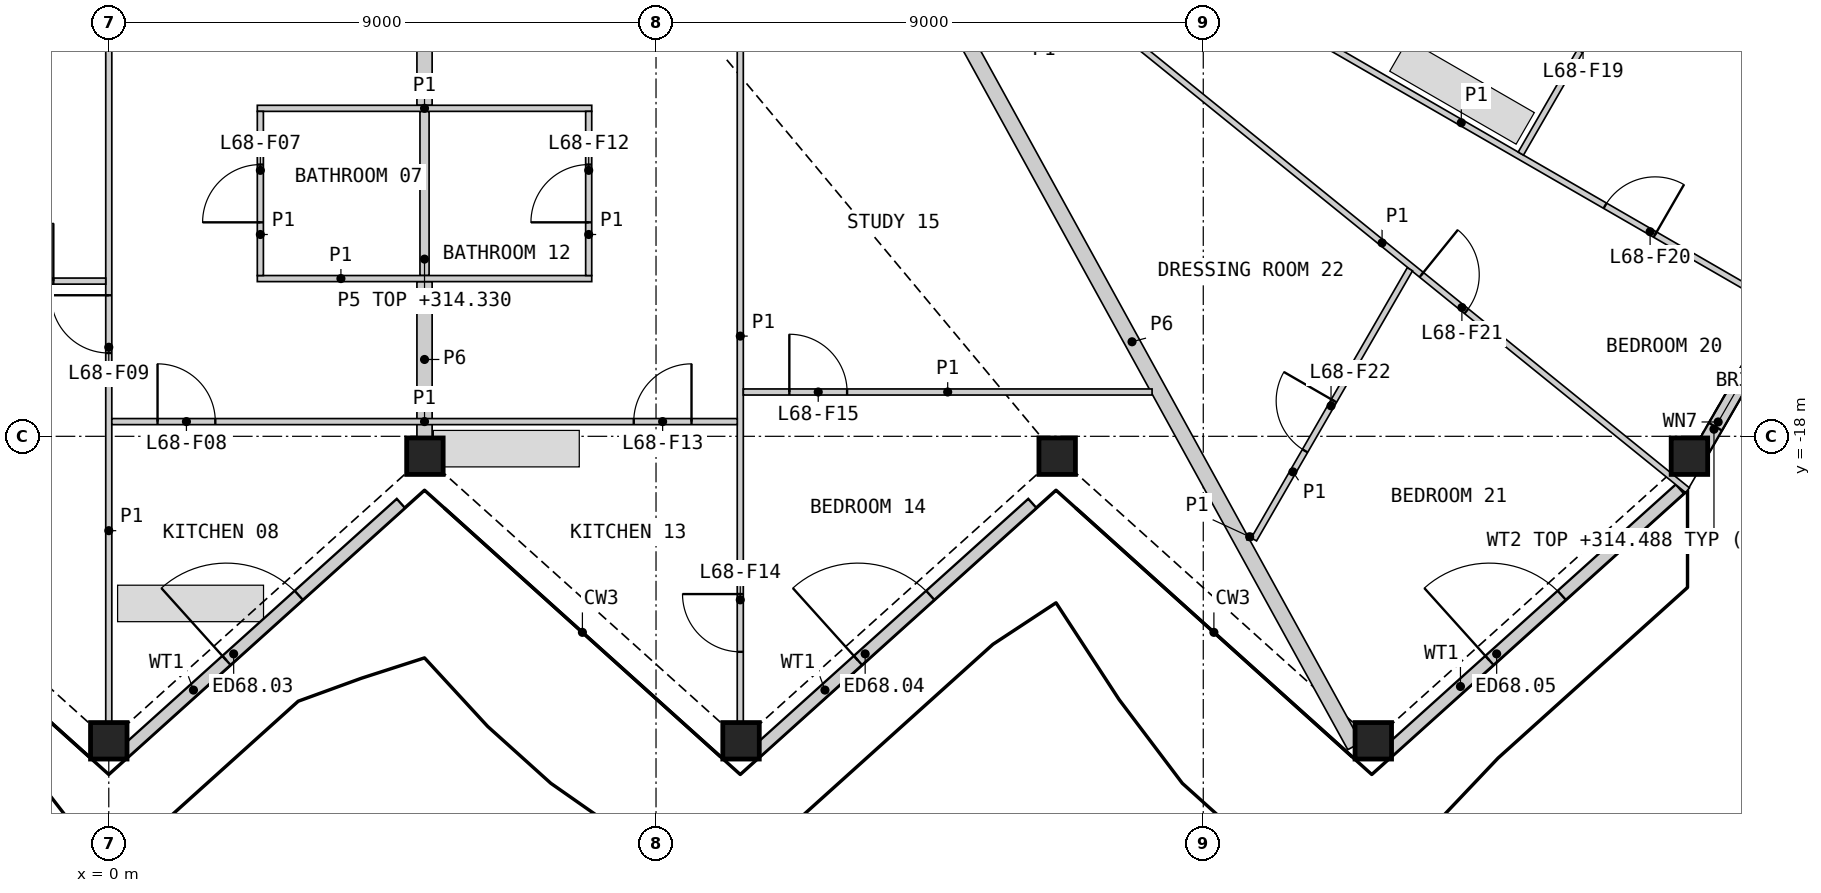
"""IFC4 building model, lengths in metres.
Left out: names, types, materials, properties, quantities, classifications, styles, units other than length and angle.
Written with IfcOpenShell. Run it as: python <this file> out.ifc"""

import sys

from ifc_helpers import new_model, si_unit, direction, frame, frame_2d, origin, origin_2d, place, context, subcontext, project, spatial, rectangle, hollow_rectangle, extrude, element, fill, save


model = new_model("IFC4")
c1 = context("Model", 3, precision=1e-05, world=origin(), true_north=direction((0.0, 1.0)))
c2 = subcontext(c1, "Body", "Model", "MODEL_VIEW")
j1 = project(units=[si_unit("LENGTHUNIT", "METRE"), si_unit("PLANEANGLEUNIT", "RADIAN")], contexts=[c1])
p1 = place(None, origin())
s1 = spatial("IfcSite", under=j1, at=p1, CompositionType="ELEMENT")
p2 = place(p1, origin())
s2 = spatial("IfcBuilding", under=s1, at=p2, CompositionType="ELEMENT")
p3 = place(p2, frame((0.0, 0.0, 312.0)))
s3 = spatial("IfcBuildingStorey", under=s2, at=p3, CompositionType="ELEMENT", Elevation=312.0)
for number, where, z_axis, x_axis in (
    (1, (0.0, -23.008, 0.0), (0.0, 0.0, 1.0), (1.0, 0.0, 0.0)),
    (2, (5.199, -18.327, 0.0), (0.0, 0.0, 1.0), (1.0, 0.0, 0.0)),
    (3, (10.398, -23.008, 0.0), (0.0, 0.0, 1.0), (1.0, 0.0, 0.0)),
    (4, (15.597, -18.327, 0.0), (0.0, 0.0, 1.0), (1.0, 0.0, 0.0)),
    (5, (20.796, -23.008, 0.0), (0.0, 0.0, 1.0), (1.0, 0.0, 0.0)),
    (6, (25.995, -18.327, 0.0), (0.0, 0.0, 1.0), (1.0, 0.0, 0.0)),
):
    element("IfcColumn", number, at=place(p3, frame(where, z_axis=z_axis, x_axis=x_axis)), inside=s3, PredefinedType="COLUMN", context=c2, shape_type="SweptSolid", body=[
        extrude(hollow_rectangle(XDim=0.6, YDim=0.6, WallThickness=0.04, at=origin_2d()), origin(), (0.0, 0.0, 1.0), 3.4),
    ])
p4 = place(p3, frame((0.256, -23.198, 0.0), z_axis=(0.0, 0.0, 1.0), x_axis=(0.743139400616, 0.669136631229, 0.0)))
e7 = element("IfcWall", 7, at=p4, inside=s3, PredefinedType="SOLIDWALL", context=c2, shape_type="SweptSolid", body=[
    extrude(rectangle(XDim=6.12, YDim=0.2, at=frame_2d((3.06, 0.0))), origin(), (0.0, 0.0, 1.0), 2.488),
])
p5 = place(p4, frame((2.26, 0.0, 0.0)))
e8 = element("IfcOpeningElement", 8, at=p5, cuts=e7, PredefinedType="OPENING", context=c2, shape_type="SweptSolid", body=[
    extrude(rectangle(XDim=1.6, YDim=2.25, at=frame_2d((0.8, 1.125))), frame((0.0, 0.11, 0.0), z_axis=(0.0, -1.0, 0.0), x_axis=(1.0, 0.0, 0.0)), (0.0, 0.0, 1.0), 0.22),
])
p6 = place(p3, frame((10.641, -23.198, 0.0), z_axis=(0.0, 0.0, 1.0), x_axis=(0.743121537674, 0.66915646918, 0.0)))
e9 = element("IfcWall", 9, at=p6, inside=s3, PredefinedType="SOLIDWALL", context=c2, shape_type="SweptSolid", body=[
    extrude(rectangle(XDim=6.12, YDim=0.2, at=frame_2d((3.06, 0.0))), origin(), (0.0, 0.0, 1.0), 2.488),
])
p7 = place(p6, frame((2.26, 0.0, 0.0)))
e10 = element("IfcOpeningElement", 10, at=p7, cuts=e9, PredefinedType="OPENING", context=c2, shape_type="SweptSolid", body=[
    extrude(rectangle(XDim=1.6, YDim=2.25, at=frame_2d((0.8, 1.125))), frame((0.0, 0.11, 0.0), z_axis=(0.0, -1.0, 0.0), x_axis=(1.0, 0.0, 0.0)), (0.0, 0.0, 1.0), 0.22),
])
p8 = place(p3, frame((21.027, -23.198, 0.0), z_axis=(0.0, 0.0, 1.0), x_axis=(0.74314788005, 0.669127213897, 0.0)))
e11 = element("IfcWall", 11, at=p8, inside=s3, PredefinedType="SOLIDWALL", context=c2, shape_type="SweptSolid", body=[
    extrude(rectangle(XDim=6.475, YDim=0.2, at=frame_2d((3.237, 0.0))), origin(), (0.0, 0.0, 1.0), 2.488),
])
p9 = place(p8, frame((2.26, 0.0, 0.0)))
e12 = element("IfcOpeningElement", 12, at=p9, cuts=e11, PredefinedType="OPENING", context=c2, shape_type="SweptSolid", body=[
    extrude(rectangle(XDim=1.6, YDim=2.25, at=frame_2d((0.8, 1.125))), frame((0.0, 0.11, 0.0), z_axis=(0.0, -1.0, 0.0), x_axis=(1.0, 0.0, 0.0)), (0.0, 0.0, 1.0), 0.22),
])
p10 = place(p3, frame((26.073, -18.448, 0.0), z_axis=(0.0, 0.0, 1.0), x_axis=(0.499992367345, 0.866029810455, 0.0)))
e13 = element("IfcWall", 13, at=p10, inside=s3, PredefinedType="SOLIDWALL", context=c2, shape_type="SweptSolid", body=[
    extrude(rectangle(XDim=2.61, YDim=0.25, at=frame_2d((1.305, 0.0))), origin(), (0.0, 0.0, 1.0), 2.488),
])
p11 = place(p10, frame((0.7, 0.0, 1.6)))
e14 = element("IfcOpeningElement", 14, at=p11, cuts=e13, PredefinedType="OPENING", context=c2, shape_type="SweptSolid", body=[
    extrude(rectangle(XDim=0.9, YDim=0.6, at=frame_2d((0.45, 0.3))), frame((0.0, 0.135, 0.0), z_axis=(0.0, -1.0, 0.0), x_axis=(1.0, 0.0, 0.0)), (0.0, 0.0, 1.0), 0.27),
])
p12 = place(p3, frame((13.171, -9.796, 0.0), z_axis=(0.0, 0.0, 1.0), x_axis=(0.481999020381, -0.876171755053, 0.0)))
e15 = element("IfcWall", 15, at=p12, inside=s3, PredefinedType="PARTITIONING", context=c2, shape_type="SweptSolid", body=[
    extrude(rectangle(XDim=15.178, YDim=0.25, at=frame_2d((7.589, 0.0))), origin(), (0.0, 0.0, 1.0), 2.33),
])
p13 = place(p3, frame((5.193, -12.556, 0.0), z_axis=(0.0, 0.0, 1.0), x_axis=(0.0, 1.0, 0.0)))
e16 = element("IfcWall", 16, at=p13, inside=s3, PredefinedType="PARTITIONING", context=c2, shape_type="SweptSolid", body=[
    extrude(rectangle(XDim=2.55, YDim=0.25, at=frame_2d((1.275, 0.0))), origin(), (0.0, 0.0, 1.0), 2.33),
])
p14 = place(p3, frame((5.193, -18.017, 0.0), z_axis=(0.0, 0.0, 1.0), x_axis=(0.0, 1.0, 0.0)))
e17 = element("IfcWall", 17, at=p14, inside=s3, PredefinedType="PARTITIONING", context=c2, shape_type="SweptSolid", body=[
    extrude(rectangle(XDim=2.561, YDim=0.25, at=frame_2d((1.281, 0.0))), origin(), (0.0, 0.0, 1.0), 2.33),
])
p15 = place(p3, frame((5.193, -15.356, 0.0), z_axis=(0.0, 0.0, 1.0), x_axis=(0.0, 1.0, 0.0)))
e18 = element("IfcWall", 18, at=p15, inside=s3, PredefinedType="PLUMBINGWALL", context=c2, shape_type="SweptSolid", body=[
    extrude(rectangle(XDim=2.7, YDim=0.15, at=frame_2d((1.35, 0.0))), origin(), (0.0, 0.0, 1.0), 2.33),
])
p16 = place(p3, frame((15.917, -10.751, 0.0), z_axis=(0.0, 0.0, 1.0), x_axis=(0.777149866095, -0.629315569193, 0.0)))
e19 = element("IfcWall", 19, at=p16, inside=s3, PredefinedType="PARTITIONING", context=c2, shape_type="SweptSolid", body=[
    extrude(rectangle(XDim=12.927, YDim=0.1, at=frame_2d((6.464, 0.0))), origin(), (0.0, 0.0, 1.0), 2.33),
])
p17 = place(p16, frame((7.298, 0.0, 0.0)))
e20 = element("IfcOpeningElement", 20, at=p17, cuts=e19, PredefinedType="OPENING", context=c2, shape_type="SweptSolid", body=[
    extrude(rectangle(XDim=0.95, YDim=2.1, at=frame_2d((0.475, 1.05))), frame((0.0, 0.06, 0.0), z_axis=(0.0, -1.0, 0.0), x_axis=(1.0, 0.0, 0.0)), (0.0, 0.0, 1.0), 0.12),
])
p18 = place(p3, frame((10.385, -22.698, 0.0), z_axis=(0.0, 0.0, 1.0), x_axis=(0.0, 1.0, 0.0)))
e21 = element("IfcWall", 21, at=p18, inside=s3, PredefinedType="PARTITIONING", context=c2, shape_type="SweptSolid", body=[
    extrude(rectangle(XDim=12.692, YDim=0.1, at=frame_2d((6.346, 0.0))), origin(), (0.0, 0.0, 1.0), 2.33),
])
p19 = place(p18, frame((1.153, 0.0, 0.0)))
e22 = element("IfcOpeningElement", 22, at=p19, cuts=e21, PredefinedType="OPENING", context=c2, shape_type="SweptSolid", body=[
    extrude(rectangle(XDim=0.95, YDim=2.1, at=frame_2d((0.475, 1.05))), frame((0.0, 0.06, 0.0), z_axis=(0.0, -1.0, 0.0), x_axis=(1.0, 0.0, 0.0)), (0.0, 0.0, 1.0), 0.12),
])
p20 = place(p3, frame((0.0, -22.698, 0.0), z_axis=(0.0, 0.0, 1.0), x_axis=(0.0, 1.0, 0.0)))
e23 = element("IfcWall", 23, at=p20, inside=s3, PredefinedType="PARTITIONING", context=c2, shape_type="SweptSolid", body=[
    extrude(rectangle(XDim=12.585, YDim=0.1, at=frame_2d((6.292, 0.0))), origin(), (0.0, 0.0, 1.0), 2.33),
])
p21 = place(p20, frame((6.068, 0.0, 0.0)))
e24 = element("IfcOpeningElement", 24, at=p21, cuts=e23, PredefinedType="OPENING", context=c2, shape_type="SweptSolid", body=[
    extrude(rectangle(XDim=0.95, YDim=2.1, at=frame_2d((0.475, 1.05))), frame((0.0, 0.06, 0.0), z_axis=(0.0, -1.0, 0.0), x_axis=(1.0, 0.0, 0.0)), (0.0, 0.0, 1.0), 0.12),
])
p22 = place(p3, frame((17.365, -10.025, 0.0), z_axis=(0.0, 0.0, 1.0), x_axis=(0.866021046153, -0.500007547564, 0.0)))
e25 = element("IfcWall", 25, at=p22, inside=s3, PredefinedType="PARTITIONING", context=c2, shape_type="SweptSolid", body=[
    extrude(rectangle(XDim=11.267, YDim=0.1, at=frame_2d((5.634, 0.0))), origin(), (0.0, 0.0, 1.0), 2.33),
])
p23 = place(p22, frame((8.364, 0.0, 0.0)))
e26 = element("IfcOpeningElement", 26, at=p23, cuts=e25, PredefinedType="OPENING", context=c2, shape_type="SweptSolid", body=[
    extrude(rectangle(XDim=0.95, YDim=2.1, at=frame_2d((0.475, 1.05))), frame((0.0, 0.06, 0.0), z_axis=(0.0, -1.0, 0.0), x_axis=(1.0, 0.0, 0.0)), (0.0, 0.0, 1.0), 0.12),
])
p24 = place(p3, frame((0.05, -17.758, 0.0), z_axis=(0.0, 0.0, 1.0), x_axis=(1.0, 0.0, 0.0)))
e27 = element("IfcWall", 27, at=p24, inside=s3, PredefinedType="PARTITIONING", context=c2, shape_type="SweptSolid", body=[
    extrude(rectangle(XDim=10.286, YDim=0.1, at=frame_2d((5.143, 0.0))), origin(), (0.0, 0.0, 1.0), 2.33),
])
p25 = place(p24, frame((0.752, 0.0, 0.0)))
e28 = element("IfcOpeningElement", 28, at=p25, cuts=e27, PredefinedType="OPENING", context=c2, shape_type="SweptSolid", body=[
    extrude(rectangle(XDim=0.95, YDim=2.1, at=frame_2d((0.475, 1.05))), frame((0.0, 0.06, 0.0), z_axis=(0.0, -1.0, 0.0), x_axis=(1.0, 0.0, 0.0)), (0.0, 0.0, 1.0), 0.12),
])
p26 = place(p24, frame((8.584, 0.0, 0.0)))
e29 = element("IfcOpeningElement", 29, at=p26, cuts=e27, PredefinedType="OPENING", context=c2, shape_type="SweptSolid", body=[
    extrude(rectangle(XDim=0.95, YDim=2.1, at=frame_2d((0.475, 1.05))), frame((0.0, 0.06, 0.0), z_axis=(0.0, -1.0, 0.0), x_axis=(1.0, 0.0, 0.0)), (0.0, 0.0, 1.0), 0.12),
])
p27 = place(p3, frame((23.223, -13.35, 0.0), z_axis=(0.0, 0.0, 1.0), x_axis=(0.500018284498, 0.866014846967, 0.0)))
e30 = element("IfcWall", 30, at=p27, inside=s3, PredefinedType="PARTITIONING", context=c2, shape_type="SweptSolid", body=[
    extrude(rectangle(XDim=7.953, YDim=0.1, at=frame_2d((3.977, 0.0))), origin(), (0.0, 0.0, 1.0), 2.33),
])
p28 = place(p27, frame((1.951, 0.0, 0.0)))
e31 = element("IfcOpeningElement", 31, at=p28, cuts=e30, PredefinedType="OPENING", context=c2, shape_type="SweptSolid", body=[
    extrude(rectangle(XDim=0.95, YDim=2.1, at=frame_2d((0.475, 1.05))), frame((0.0, 0.06, 0.0), z_axis=(0.0, -1.0, 0.0), x_axis=(1.0, 0.0, 0.0)), (0.0, 0.0, 1.0), 0.12),
])
p29 = place(p3, frame((10.436, -17.271, 0.0), z_axis=(0.0, 0.0, 1.0), x_axis=(1.0, 0.0, 0.0)))
e32 = element("IfcWall", 32, at=p29, inside=s3, PredefinedType="PARTITIONING", context=c2, shape_type="SweptSolid", body=[
    extrude(rectangle(XDim=6.722, YDim=0.1, at=frame_2d((3.361, 0.0))), origin(), (0.0, 0.0, 1.0), 2.33),
])
p30 = place(p29, frame((0.757, 0.0, 0.0)))
e33 = element("IfcOpeningElement", 33, at=p30, cuts=e32, PredefinedType="OPENING", context=c2, shape_type="SweptSolid", body=[
    extrude(rectangle(XDim=0.95, YDim=2.1, at=frame_2d((0.475, 1.05))), frame((0.0, 0.06, 0.0), z_axis=(0.0, -1.0, 0.0), x_axis=(1.0, 0.0, 0.0)), (0.0, 0.0, 1.0), 0.12),
])
for number, where, z_axis, x_axis in (
    (34, (2.443, -12.606, 0.0), (0.0, 0.0, 1.0), (1.0, 0.0, 0.0)),
    (35, (2.443, -15.406, 0.0), (0.0, 0.0, 1.0), (1.0, 0.0, 0.0)),
):
    element("IfcWall", number, at=place(p3, frame(where, z_axis=z_axis, x_axis=x_axis)), inside=s3, PredefinedType="PARTITIONING", context=c2, shape_type="SweptSolid", body=[
        extrude(rectangle(XDim=5.5, YDim=0.1, at=frame_2d((2.75, 0.0))), origin(), (0.0, 0.0, 1.0), 2.33),
    ])
p31 = place(p3, frame((-5.068, -15.447, 0.0), z_axis=(0.0, 0.0, 1.0), x_axis=(1.0, 0.0, 0.0)))
e36 = element("IfcWall", 36, at=p31, inside=s3, PredefinedType="PARTITIONING", context=c2, shape_type="SweptSolid", body=[
    extrude(rectangle(XDim=5.018, YDim=0.1, at=frame_2d((2.509, 0.0))), origin(), (0.0, 0.0, 1.0), 2.33),
])
p32 = place(p31, frame((3.206, 0.0, 0.0)))
e37 = element("IfcOpeningElement", 37, at=p32, cuts=e36, PredefinedType="OPENING", context=c2, shape_type="SweptSolid", body=[
    extrude(rectangle(XDim=0.95, YDim=2.1, at=frame_2d((0.475, 1.05))), frame((0.0, 0.06, 0.0), z_axis=(0.0, -1.0, 0.0), x_axis=(1.0, 0.0, 0.0)), (0.0, 0.0, 1.0), 0.12),
])
p33 = place(p3, frame((18.833, -19.695, 0.0), z_axis=(0.0, 0.0, 1.0), x_axis=(0.500034163155, 0.866005678779, 0.0)))
e38 = element("IfcWall", 38, at=p33, inside=s3, PredefinedType="PARTITIONING", context=c2, shape_type="SweptSolid", body=[
    extrude(rectangle(XDim=5.13, YDim=0.1, at=frame_2d((2.565, 0.0))), origin(), (0.0, 0.0, 1.0), 2.33),
])
p34 = place(p33, frame((1.681, 0.0, 0.0)))
e39 = element("IfcOpeningElement", 39, at=p34, cuts=e38, PredefinedType="OPENING", context=c2, shape_type="SweptSolid", body=[
    extrude(rectangle(XDim=0.95, YDim=2.1, at=frame_2d((0.475, 1.05))), frame((0.0, 0.06, 0.0), z_axis=(0.0, -1.0, 0.0), x_axis=(1.0, 0.0, 0.0)), (0.0, 0.0, 1.0), 0.12),
])
p35 = place(p3, frame((2.493, -15.356, 0.0), z_axis=(0.0, 0.0, 1.0), x_axis=(0.0, 1.0, 0.0)))
e40 = element("IfcWall", 40, at=p35, inside=s3, PredefinedType="PARTITIONING", context=c2, shape_type="SweptSolid", body=[
    extrude(rectangle(XDim=2.7, YDim=0.1, at=frame_2d((1.35, 0.0))), origin(), (0.0, 0.0, 1.0), 2.33),
])
p36 = place(p35, frame((0.875, 0.0, 0.0)))
e41 = element("IfcOpeningElement", 41, at=p36, cuts=e40, PredefinedType="OPENING", context=c2, shape_type="SweptSolid", body=[
    extrude(rectangle(XDim=0.95, YDim=2.1, at=frame_2d((0.475, 1.05))), frame((0.0, 0.06, 0.0), z_axis=(0.0, -1.0, 0.0), x_axis=(1.0, 0.0, 0.0)), (0.0, 0.0, 1.0), 0.12),
])
p37 = place(p3, frame((7.893, -15.356, 0.0), z_axis=(0.0, 0.0, 1.0), x_axis=(0.0, 1.0, 0.0)))
e42 = element("IfcWall", 42, at=p37, inside=s3, PredefinedType="PARTITIONING", context=c2, shape_type="SweptSolid", body=[
    extrude(rectangle(XDim=2.7, YDim=0.1, at=frame_2d((1.35, 0.0))), origin(), (0.0, 0.0, 1.0), 2.33),
])
p38 = place(p37, frame((0.875, 0.0, 0.0)))
e43 = element("IfcOpeningElement", 43, at=p38, cuts=e42, PredefinedType="OPENING", context=c2, shape_type="SweptSolid", body=[
    extrude(rectangle(XDim=0.95, YDim=2.1, at=frame_2d((0.475, 1.05))), frame((0.0, 0.06, 0.0), z_axis=(0.0, -1.0, 0.0), x_axis=(1.0, 0.0, 0.0)), (0.0, 0.0, 1.0), 0.12),
])
p39 = place(p3, frame((18.718, -19.652, 0.0), z_axis=(0.0, 0.0, 1.0), x_axis=(1.0, 0.0, 0.0)))
e44 = element("IfcWall", 44, at=p39, inside=s3, PredefinedType="PARTITIONING", context=c2, shape_type="SweptSolid", body=[
    extrude(rectangle(XDim=0.09, YDim=0.1, at=frame_2d((0.045, 0.0))), origin(), (0.0, 0.0, 1.0), 2.33),
])
p40 = place(p5, origin())
e45 = element("IfcDoor", 45, at=p40, inside=s3, OperationType="DOUBLE_DOOR_SINGLE_SWING", PredefinedType="DOOR", context=c2, shape_type="SweptSolid", body=[
    extrude(rectangle(XDim=1.6, YDim=2.25, at=frame_2d((0.8, 1.125))), frame((0.0, 0.025, 0.0), z_axis=(0.0, -1.0, 0.0), x_axis=(1.0, 0.0, 0.0)), (0.0, 0.0, 1.0), 0.05),
])
fill(e8, e45)
p41 = place(p7, origin())
e46 = element("IfcDoor", 46, at=p41, inside=s3, OperationType="DOUBLE_DOOR_SINGLE_SWING", PredefinedType="DOOR", context=c2, shape_type="SweptSolid", body=[
    extrude(rectangle(XDim=1.6, YDim=2.25, at=frame_2d((0.8, 1.125))), frame((0.0, 0.025, 0.0), z_axis=(0.0, -1.0, 0.0), x_axis=(1.0, 0.0, 0.0)), (0.0, 0.0, 1.0), 0.05),
])
fill(e10, e46)
p42 = place(p9, origin())
e47 = element("IfcDoor", 47, at=p42, inside=s3, OperationType="DOUBLE_DOOR_SINGLE_SWING", PredefinedType="DOOR", context=c2, shape_type="SweptSolid", body=[
    extrude(rectangle(XDim=1.6, YDim=2.25, at=frame_2d((0.8, 1.125))), frame((0.0, 0.025, 0.0), z_axis=(0.0, -1.0, 0.0), x_axis=(1.0, 0.0, 0.0)), (0.0, 0.0, 1.0), 0.05),
])
fill(e12, e47)
p43 = place(p11, origin())
e48 = element("IfcWindow", 48, at=p43, inside=s3, PartitioningType="SINGLE_PANEL", PredefinedType="WINDOW", context=c2, shape_type="SweptSolid", body=[
    extrude(rectangle(XDim=0.9, YDim=0.6, at=frame_2d((0.45, 0.3))), frame((0.0, 0.03, 0.0), z_axis=(0.0, -1.0, 0.0), x_axis=(1.0, 0.0, 0.0)), (0.0, 0.0, 1.0), 0.06),
])
fill(e14, e48)
p44 = place(p36, origin())
e49 = element("IfcDoor", 49, at=p44, inside=s3, OperationType="SINGLE_SWING_LEFT", PredefinedType="DOOR", context=c2, shape_type="SweptSolid", body=[
    extrude(rectangle(XDim=0.95, YDim=2.1, at=frame_2d((0.475, 1.05))), frame((0.0, 0.025, 0.0), z_axis=(0.0, -1.0, 0.0), x_axis=(1.0, 0.0, 0.0)), (0.0, 0.0, 1.0), 0.05),
])
fill(e41, e49)
p45 = place(p25, origin())
e50 = element("IfcDoor", 50, at=p45, inside=s3, OperationType="SINGLE_SWING_LEFT", PredefinedType="DOOR", context=c2, shape_type="SweptSolid", body=[
    extrude(rectangle(XDim=0.95, YDim=2.1, at=frame_2d((0.475, 1.05))), frame((0.0, 0.025, 0.0), z_axis=(0.0, -1.0, 0.0), x_axis=(1.0, 0.0, 0.0)), (0.0, 0.0, 1.0), 0.05),
])
fill(e28, e50)
p46 = place(p21, origin())
e51 = element("IfcDoor", 51, at=p46, inside=s3, OperationType="SINGLE_SWING_RIGHT", PredefinedType="DOOR", context=c2, shape_type="SweptSolid", body=[
    extrude(rectangle(XDim=0.95, YDim=2.1, at=frame_2d((0.475, 1.05))), frame((0.0, 0.025, 0.0), z_axis=(0.0, -1.0, 0.0), x_axis=(1.0, 0.0, 0.0)), (0.0, 0.0, 1.0), 0.05),
])
fill(e24, e51)
p47 = place(p32, origin())
e52 = element("IfcDoor", 52, at=p47, inside=s3, OperationType="SINGLE_SWING_RIGHT", PredefinedType="DOOR", context=c2, shape_type="SweptSolid", body=[
    extrude(rectangle(XDim=0.95, YDim=2.1, at=frame_2d((0.475, 1.05))), frame((0.0, 0.025, 0.0), z_axis=(0.0, -1.0, 0.0), x_axis=(1.0, 0.0, 0.0)), (0.0, 0.0, 1.0), 0.05),
])
fill(e37, e52)
p48 = place(p38, origin())
e53 = element("IfcDoor", 53, at=p48, inside=s3, OperationType="SINGLE_SWING_LEFT", PredefinedType="DOOR", context=c2, shape_type="SweptSolid", body=[
    extrude(rectangle(XDim=0.95, YDim=2.1, at=frame_2d((0.475, 1.05))), frame((0.0, 0.025, 0.0), z_axis=(0.0, -1.0, 0.0), x_axis=(1.0, 0.0, 0.0)), (0.0, 0.0, 1.0), 0.05),
])
fill(e43, e53)
p49 = place(p26, origin())
e54 = element("IfcDoor", 54, at=p49, inside=s3, OperationType="SINGLE_SWING_RIGHT", PredefinedType="DOOR", context=c2, shape_type="SweptSolid", body=[
    extrude(rectangle(XDim=0.95, YDim=2.1, at=frame_2d((0.475, 1.05))), frame((0.0, 0.025, 0.0), z_axis=(0.0, -1.0, 0.0), x_axis=(1.0, 0.0, 0.0)), (0.0, 0.0, 1.0), 0.05),
])
fill(e29, e54)
p50 = place(p19, origin())
e55 = element("IfcDoor", 55, at=p50, inside=s3, OperationType="SINGLE_SWING_RIGHT", PredefinedType="DOOR", context=c2, shape_type="SweptSolid", body=[
    extrude(rectangle(XDim=0.95, YDim=2.1, at=frame_2d((0.475, 1.05))), frame((0.0, 0.025, 0.0), z_axis=(0.0, -1.0, 0.0), x_axis=(1.0, 0.0, 0.0)), (0.0, 0.0, 1.0), 0.05),
])
fill(e22, e55)
p51 = place(p30, origin())
e56 = element("IfcDoor", 56, at=p51, inside=s3, OperationType="SINGLE_SWING_LEFT", PredefinedType="DOOR", context=c2, shape_type="SweptSolid", body=[
    extrude(rectangle(XDim=0.95, YDim=2.1, at=frame_2d((0.475, 1.05))), frame((0.0, 0.025, 0.0), z_axis=(0.0, -1.0, 0.0), x_axis=(1.0, 0.0, 0.0)), (0.0, 0.0, 1.0), 0.05),
])
fill(e33, e56)
p52 = place(p23, origin())
e57 = element("IfcDoor", 57, at=p52, inside=s3, OperationType="SINGLE_SWING_RIGHT", PredefinedType="DOOR", context=c2, shape_type="SweptSolid", body=[
    extrude(rectangle(XDim=0.95, YDim=2.1, at=frame_2d((0.475, 1.05))), frame((0.0, 0.025, 0.0), z_axis=(0.0, -1.0, 0.0), x_axis=(1.0, 0.0, 0.0)), (0.0, 0.0, 1.0), 0.05),
])
fill(e26, e57)
p53 = place(p17, origin())
e58 = element("IfcDoor", 58, at=p53, inside=s3, OperationType="SINGLE_SWING_LEFT", PredefinedType="DOOR", context=c2, shape_type="SweptSolid", body=[
    extrude(rectangle(XDim=0.95, YDim=2.1, at=frame_2d((0.475, 1.05))), frame((0.0, 0.025, 0.0), z_axis=(0.0, -1.0, 0.0), x_axis=(1.0, 0.0, 0.0)), (0.0, 0.0, 1.0), 0.05),
])
fill(e20, e58)
p54 = place(p34, origin())
e59 = element("IfcDoor", 59, at=p54, inside=s3, OperationType="SINGLE_SWING_RIGHT", PredefinedType="DOOR", context=c2, shape_type="SweptSolid", body=[
    extrude(rectangle(XDim=0.95, YDim=2.1, at=frame_2d((0.475, 1.05))), frame((0.0, 0.025, 0.0), z_axis=(0.0, -1.0, 0.0), x_axis=(1.0, 0.0, 0.0)), (0.0, 0.0, 1.0), 0.05),
])
fill(e39, e59)
save(model, sys.argv[1])
